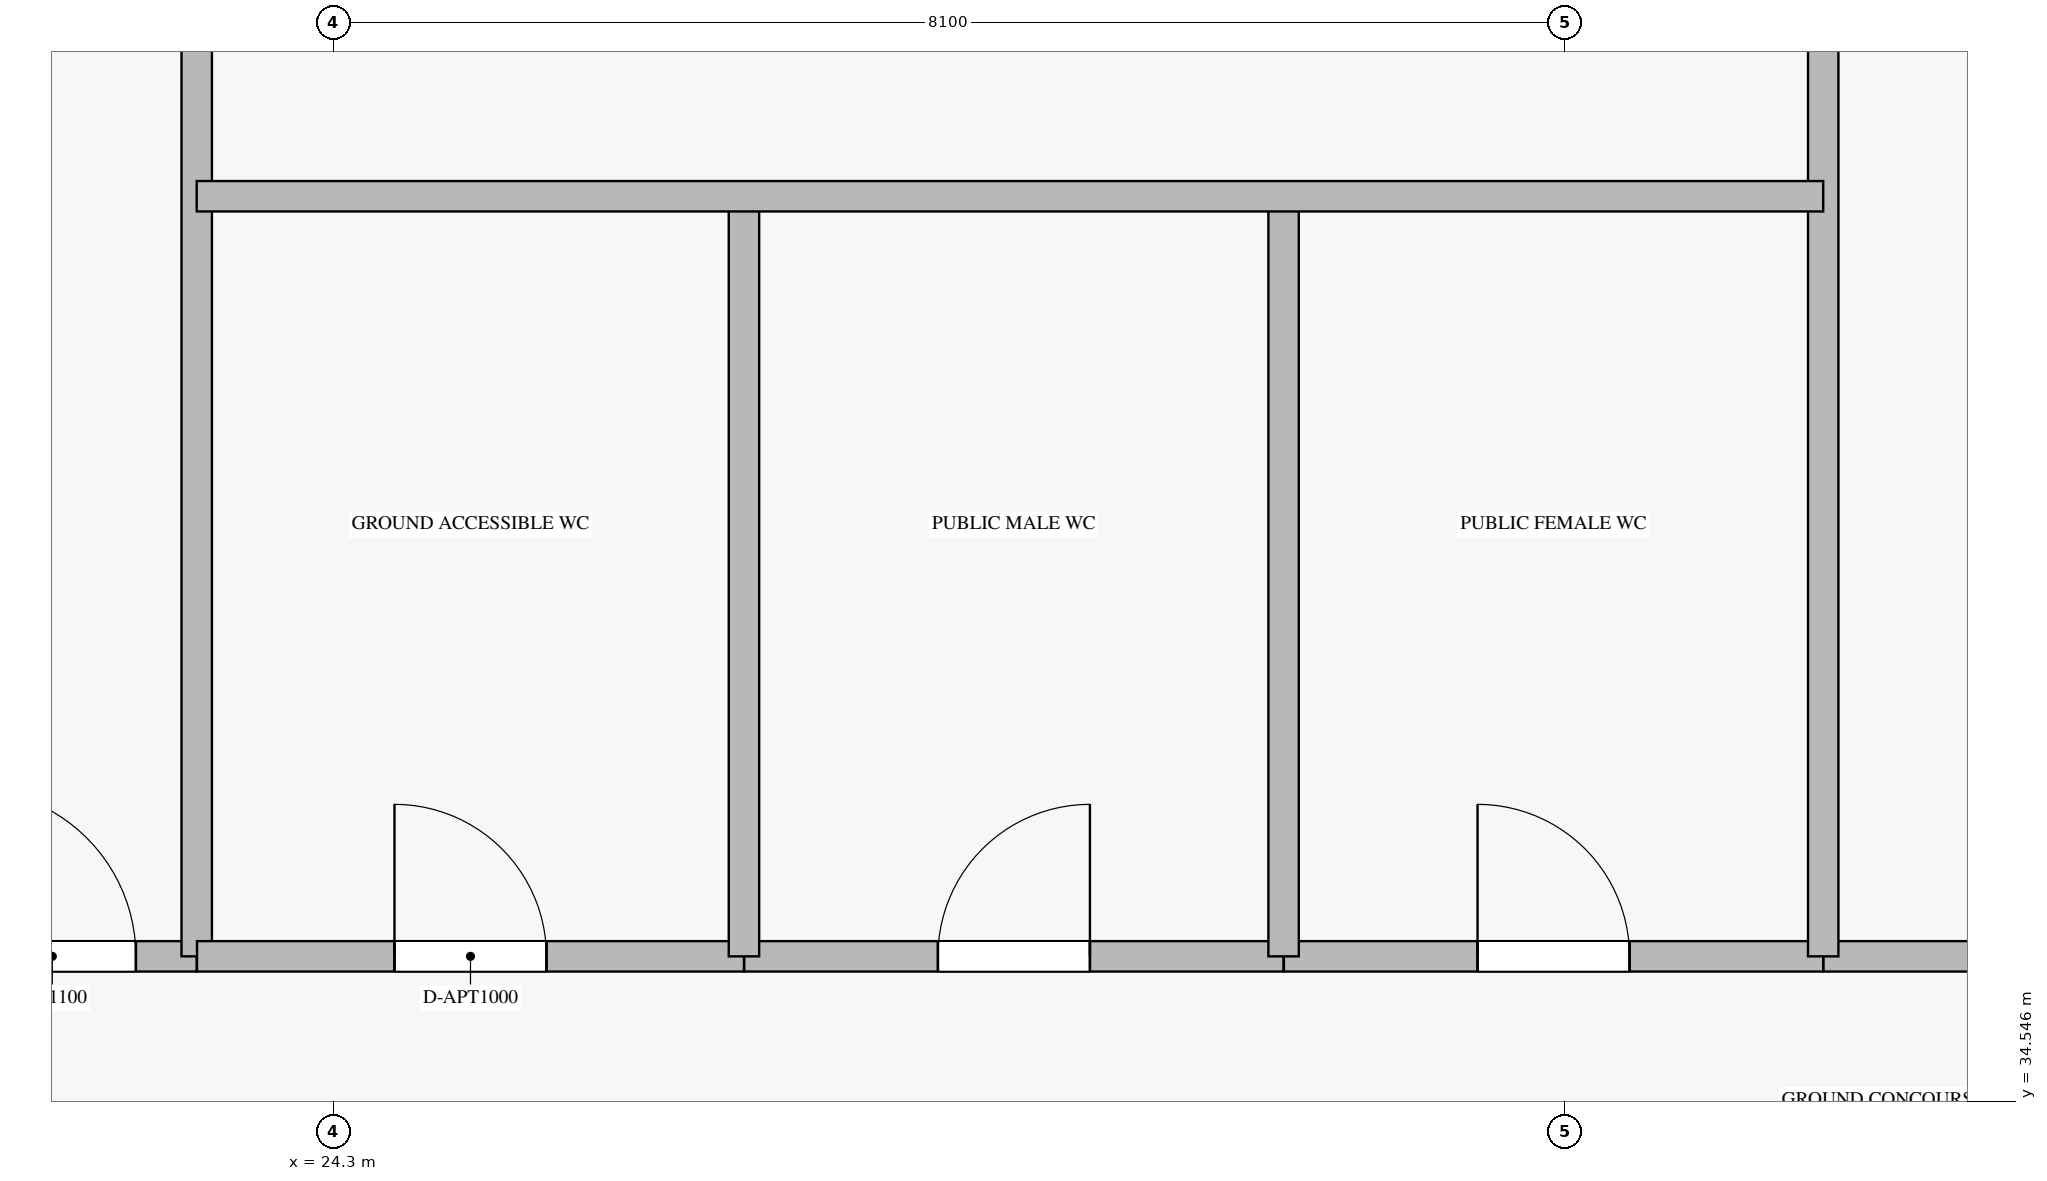
"""IFC4 building model, lengths in metres.
Left out: names, types, materials, properties, quantities, classifications, styles, units other than length and angle.
Written with IfcOpenShell. Run it as: python <this file> out.ifc"""

import sys

from ifc_helpers import new_model, si_unit, direction, frame, frame_2d, origin, place, context, subcontext, project, spatial, rectangle, extrude, source, transform, mapped, element, fill, save


model = new_model("IFC4")
c1 = context("Model", 3, precision=1e-05, world=origin(), true_north=direction((0.0, 1.0)))
c2 = subcontext(c1, "Body", "Model", "MODEL_VIEW")
j1 = project(units=[si_unit("LENGTHUNIT", "METRE"), si_unit("PLANEANGLEUNIT", "RADIAN")], contexts=[c1])
p1 = place(None, origin())
s1 = spatial("IfcSite", under=j1, at=p1, CompositionType="ELEMENT")
p2 = place(p1, origin())
s2 = spatial("IfcBuilding", under=s1, at=p2, CompositionType="ELEMENT")
p3 = place(p2, origin())
s3 = spatial("IfcBuildingStorey", under=s2, at=p3, CompositionType="ELEMENT", Elevation=0.0)
p4 = place(p3, frame((21.5, 35.5, 0.0), z_axis=(0.0, 0.0, 1.0), x_axis=(1.0, 0.0, 0.0)))
e1 = element("IfcWall", 1, at=p4, inside=s3, PredefinedType="STANDARD", context=c2, shape_type="SweptSolid", body=[
    extrude(rectangle(XDim=1.9, YDim=0.2, at=frame_2d((0.95, 0.0))), origin(), (0.0, 0.0, 1.0), 5.12),
])
p5 = place(p4, frame((0.4, 0.0, 0.0)))
e2 = element("IfcOpeningElement", 2, at=p5, cuts=e1, PredefinedType="OPENING", context=c2, shape_type="SweptSolid", body=[
    extrude(rectangle(XDim=1.1, YDim=2.15, at=frame_2d((0.55, 1.075))), frame((0.0, 0.11, 0.0), z_axis=(0.0, -1.0, 0.0), x_axis=(1.0, 0.0, 0.0)), (0.0, 0.0, 1.0), 0.22),
])
p6 = place(p3, frame((23.4, 35.5, 0.0), z_axis=(0.0, 0.0, 1.0), x_axis=(0.0, 1.0, 0.0)))
e3 = element("IfcWall", 3, at=p6, inside=s3, PredefinedType="STANDARD", context=c2, shape_type="SweptSolid", body=[
    extrude(rectangle(XDim=10.7, YDim=0.2, at=frame_2d((5.35, 0.0))), origin(), (0.0, 0.0, 1.0), 5.12),
])
p7 = place(p3, frame((23.402, 35.5, 0.0), z_axis=(0.0, 0.0, 1.0), x_axis=(1.0, 0.0, 0.0)))
e4 = element("IfcWall", 4, at=p7, inside=s3, PredefinedType="STANDARD", context=c2, shape_type="SweptSolid", body=[
    extrude(rectangle(XDim=3.598, YDim=0.2, at=frame_2d((1.799, 0.0))), origin(), (0.0, 0.0, 1.0), 5.12),
])
p8 = place(p7, frame((1.299, 0.0, 0.0)))
e5 = element("IfcOpeningElement", 5, at=p8, cuts=e4, PredefinedType="OPENING", context=c2, shape_type="SweptSolid", body=[
    extrude(rectangle(XDim=1.0, YDim=2.15, at=frame_2d((0.5, 1.075))), frame((0.0, 0.11, 0.0), z_axis=(0.0, -1.0, 0.0), x_axis=(1.0, 0.0, 0.0)), (0.0, 0.0, 1.0), 0.22),
])
p9 = place(p3, frame((27.002, 35.5, 0.0), z_axis=(0.0, 0.0, 1.0), x_axis=(1.0, 0.0, 0.0)))
e6 = element("IfcWall", 6, at=p9, inside=s3, PredefinedType="STANDARD", context=c2, shape_type="SweptSolid", body=[
    extrude(rectangle(XDim=3.548, YDim=0.2, at=frame_2d((1.774, 0.0))), origin(), (0.0, 0.0, 1.0), 5.12),
])
p10 = place(p9, frame((1.274, 0.0, 0.0)))
e7 = element("IfcOpeningElement", 7, at=p10, cuts=e6, PredefinedType="OPENING", context=c2, shape_type="SweptSolid", body=[
    extrude(rectangle(XDim=1.0, YDim=2.15, at=frame_2d((0.5, 1.075))), frame((0.0, 0.11, 0.0), z_axis=(0.0, -1.0, 0.0), x_axis=(1.0, 0.0, 0.0)), (0.0, 0.0, 1.0), 0.22),
])
p11 = place(p3, frame((30.552, 35.5, 0.0), z_axis=(0.0, 0.0, 1.0), x_axis=(1.0, 0.0, 0.0)))
e8 = element("IfcWall", 8, at=p11, inside=s3, PredefinedType="STANDARD", context=c2, shape_type="SweptSolid", body=[
    extrude(rectangle(XDim=3.548, YDim=0.2, at=frame_2d((1.774, 0.0))), origin(), (0.0, 0.0, 1.0), 5.12),
])
p12 = place(p11, frame((1.274, 0.0, 0.0)))
e9 = element("IfcOpeningElement", 9, at=p12, cuts=e8, PredefinedType="OPENING", context=c2, shape_type="SweptSolid", body=[
    extrude(rectangle(XDim=1.0, YDim=2.15, at=frame_2d((0.5, 1.075))), frame((0.0, 0.11, 0.0), z_axis=(0.0, -1.0, 0.0), x_axis=(1.0, 0.0, 0.0)), (0.0, 0.0, 1.0), 0.22),
])
p13 = place(p3, frame((34.102, 35.5, 0.0), z_axis=(0.0, 0.0, 1.0), x_axis=(1.0, 0.0, 0.0)))
e10 = element("IfcWall", 10, at=p13, inside=s3, PredefinedType="STANDARD", context=c2, shape_type="SweptSolid", body=[
    extrude(rectangle(XDim=9.196, YDim=0.2, at=frame_2d((4.598, 0.0))), origin(), (0.0, 0.0, 1.0), 5.12),
])
p14 = place(p13, frame((3.898, 0.0, 0.0)))
e11 = element("IfcOpeningElement", 11, at=p14, cuts=e10, PredefinedType="OPENING", context=c2, shape_type="SweptSolid", body=[
    extrude(rectangle(XDim=1.4, YDim=2.2, at=frame_2d((0.7, 1.1))), frame((0.0, 0.11, 0.0), z_axis=(0.0, -1.0, 0.0), x_axis=(1.0, 0.0, 0.0)), (0.0, 0.0, 1.0), 0.22),
])
for number, where, z_axis, x_axis in (
    (12, (27.0, 35.5, 0.0), (0.0, 0.0, 1.0), (0.0, 1.0, 0.0)),
    (13, (30.55, 35.5, 0.0), (0.0, 0.0, 1.0), (0.0, 1.0, 0.0)),
):
    element("IfcWall", number, at=place(p3, frame(where, z_axis=z_axis, x_axis=x_axis)), inside=s3, PredefinedType="STANDARD", context=c2, shape_type="SweptSolid", body=[
        extrude(rectangle(XDim=5.0, YDim=0.2, at=frame_2d((2.5, 0.0))), origin(), (0.0, 0.0, 1.0), 5.12),
    ])
p15 = place(p3, frame((34.1, 35.5, 0.0), z_axis=(0.0, 0.0, 1.0), x_axis=(0.0, 1.0, 0.0)))
e14 = element("IfcWall", 14, at=p15, inside=s3, PredefinedType="STANDARD", context=c2, shape_type="SweptSolid", body=[
    extrude(rectangle(XDim=10.7, YDim=0.2, at=frame_2d((5.35, 0.0))), origin(), (0.0, 0.0, 1.0), 5.12),
])
p16 = place(p15, frame((6.37, 0.0, 0.0)))
e15 = element("IfcOpeningElement", 15, at=p16, cuts=e14, PredefinedType="OPENING", context=c2, shape_type="SweptSolid", body=[
    extrude(rectangle(XDim=0.9, YDim=2.1, at=frame_2d((0.45, 1.05))), frame((0.0, 0.11, 0.0), z_axis=(0.0, -1.0, 0.0), x_axis=(1.0, 0.0, 0.0)), (0.0, 0.0, 1.0), 0.22),
])
p17 = place(p3, frame((23.4, 40.5, 0.0), z_axis=(0.0, 0.0, 1.0), x_axis=(1.0, 0.0, 0.0)))
e16 = element("IfcWall", 16, at=p17, inside=s3, PredefinedType="STANDARD", context=c2, shape_type="SweptSolid", body=[
    extrude(rectangle(XDim=10.7, YDim=0.2, at=frame_2d((5.35, 0.0))), origin(), (0.0, 0.0, 1.0), 5.12),
])
m1 = source(origin(), c2, "Body", "SweptSolid", [
    extrude(rectangle(XDim=1.1, YDim=2.15, at=frame_2d((0.55, 1.075))), frame((0.0, 0.025, 0.0), z_axis=(0.0, -1.0, 0.0), x_axis=(1.0, 0.0, 0.0)), (0.0, 0.0, 1.0), 0.05),
])
p18 = place(p5, origin())
e17 = element("IfcDoor", 17, at=p18, inside=s3, OperationType="SINGLE_SWING_LEFT", PredefinedType="DOOR", context=c2, shape_type="MappedRepresentation", body=[
    mapped(m1, transform((0.0, 0.0, 0.0), scale=1.0)),
])
fill(e2, e17)
m2 = source(origin(), c2, "Body", "SweptSolid", [
    extrude(rectangle(XDim=1.0, YDim=2.15, at=frame_2d((0.5, 1.075))), frame((0.0, 0.025, 0.0), z_axis=(0.0, -1.0, 0.0), x_axis=(1.0, 0.0, 0.0)), (0.0, 0.0, 1.0), 0.05),
])
p19 = place(p8, origin())
e18 = element("IfcDoor", 18, at=p19, inside=s3, OperationType="SINGLE_SWING_LEFT", PredefinedType="DOOR", context=c2, shape_type="MappedRepresentation", body=[
    mapped(m2, transform((0.0, 0.0, 0.0), scale=1.0)),
])
fill(e5, e18)
p20 = place(p10, origin())
e19 = element("IfcDoor", 19, at=p20, inside=s3, OperationType="SINGLE_SWING_RIGHT", PredefinedType="DOOR", context=c2, shape_type="MappedRepresentation", body=[
    mapped(m2, transform((0.0, 0.0, 0.0), scale=1.0)),
])
fill(e7, e19)
p21 = place(p12, origin())
e20 = element("IfcDoor", 20, at=p21, inside=s3, OperationType="SINGLE_SWING_LEFT", PredefinedType="DOOR", context=c2, shape_type="MappedRepresentation", body=[
    mapped(m2, transform((0.0, 0.0, 0.0), scale=1.0)),
])
fill(e9, e20)
save(model, sys.argv[1])
